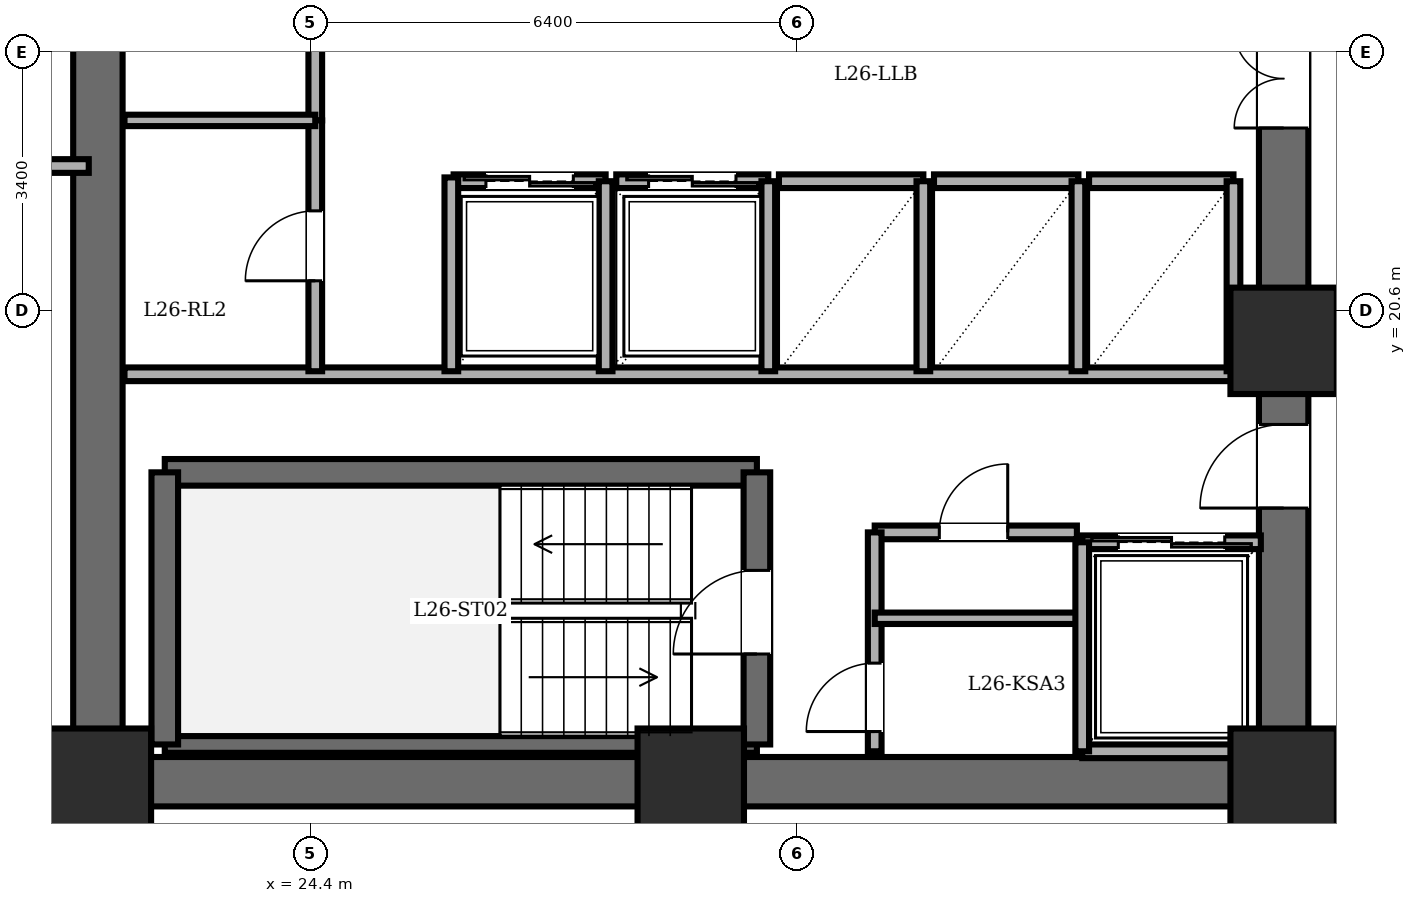
"""IFC4 building model, lengths in metres.
Left out: names, types, materials, properties, quantities, classifications, styles, units other than length and angle.
Written with IfcOpenShell. Run it as: python <this file> out.ifc"""

import sys

from ifc_helpers import new_model, si_unit, direction, frame, frame_2d, origin, origin_2d, place, context, subcontext, project, spatial, rectangle, extrude, element, fill, save


model = new_model("IFC4")
c1 = context("Model", 3, precision=1e-05, world=origin(), true_north=direction((0.0, 1.0)))
c2 = subcontext(c1, "Body", "Model", "MODEL_VIEW")
j1 = project(units=[si_unit("LENGTHUNIT", "METRE"), si_unit("PLANEANGLEUNIT", "RADIAN")], contexts=[c1])
p1 = place(None, origin())
s1 = spatial("IfcSite", under=j1, at=p1, CompositionType="ELEMENT")
p2 = place(p1, origin())
s2 = spatial("IfcBuilding", under=s1, at=p2, CompositionType="ELEMENT")
p3 = place(p2, frame((0.0, 0.0, 100.7)))
s3 = spatial("IfcBuildingStorey", under=s2, at=p3, CompositionType="ELEMENT", Elevation=100.7)
for number, where, z_axis, x_axis in (
    (1, (21.6, 14.4, 0.0), (0.0, 0.0, 1.0), (1.0, 0.0, 0.0)),
    (2, (29.4, 14.4, 0.0), (0.0, 0.0, 1.0), (1.0, 0.0, 0.0)),
    (3, (37.2, 14.4, 0.0), (0.0, 0.0, 1.0), (1.0, 0.0, 0.0)),
    (4, (37.2, 20.2, 0.0), (0.0, 0.0, 1.0), (1.0, 0.0, 0.0)),
):
    element("IfcColumn", number, at=place(p3, frame(where, z_axis=z_axis, x_axis=x_axis)), inside=s3, PredefinedType="COLUMN", context=c2, shape_type="SweptSolid", body=[
        extrude(rectangle(XDim=1.4, YDim=1.4, at=origin_2d()), origin(), (0.0, 0.0, 1.0), 3.6),
    ])
p4 = place(p3, frame((21.6, 14.4, 0.0), z_axis=(0.0, 0.0, 1.0), x_axis=(0.0, 1.0, 0.0)))
e5 = element("IfcWall", 5, at=p4, inside=s3, PredefinedType="SHEAR", context=c2, shape_type="SweptSolid", body=[
    extrude(rectangle(XDim=19.2, YDim=0.65, at=frame_2d((9.6, 0.0))), origin(), (0.0, 0.0, 1.0), 3.4),
])
p5 = place(p3, frame((37.2, 14.4, 0.0), z_axis=(0.0, 0.0, 1.0), x_axis=(-1.0, 0.0, 0.0)))
e6 = element("IfcWall", 6, at=p5, inside=s3, PredefinedType="SHEAR", context=c2, shape_type="SweptSolid", body=[
    extrude(rectangle(XDim=15.6, YDim=0.65, at=frame_2d((7.8, 0.0))), origin(), (0.0, 0.0, 1.0), 3.4),
])
p6 = place(p3, frame((37.2, 14.4, 0.0), z_axis=(0.0, 0.0, 1.0), x_axis=(0.0, 1.0, 0.0)))
e7 = element("IfcWall", 7, at=p6, inside=s3, PredefinedType="SHEAR", context=c2, shape_type="SweptSolid", body=[
    extrude(rectangle(XDim=19.2, YDim=0.65, at=frame_2d((9.6, 0.0))), origin(), (0.0, 0.0, 1.0), 3.4),
])
p7 = place(p6, frame((15.8, 0.0, 0.0)))
e8 = element("IfcOpeningElement", 8, at=p7, cuts=e7, PredefinedType="OPENING", context=c2, shape_type="SweptSolid", body=[
    extrude(rectangle(XDim=1.15, YDim=2.15, at=frame_2d((0.575, 1.075))), frame((0.0, 0.335, 0.0), z_axis=(0.0, -1.0, 0.0), x_axis=(1.0, 0.0, 0.0)), (0.0, 0.0, 1.0), 0.67),
])
p8 = place(p6, frame((3.6, 0.0, 0.0)))
e9 = element("IfcOpeningElement", 9, at=p8, cuts=e7, PredefinedType="OPENING", context=c2, shape_type="SweptSolid", body=[
    extrude(rectangle(XDim=1.1, YDim=2.15, at=frame_2d((0.55, 1.075))), frame((0.0, 0.335, 0.0), z_axis=(0.0, -1.0, 0.0), x_axis=(1.0, 0.0, 0.0)), (0.0, 0.0, 1.0), 0.67),
])
p9 = place(p6, frame((8.6, 0.0, 0.0)))
e10 = element("IfcOpeningElement", 10, at=p9, cuts=e7, PredefinedType="OPENING", context=c2, shape_type="SweptSolid", body=[
    extrude(rectangle(XDim=1.3, YDim=2.2, at=frame_2d((0.65, 1.1))), frame((0.0, 0.335, 0.0), z_axis=(0.0, -1.0, 0.0), x_axis=(1.0, 0.0, 0.0)), (0.0, 0.0, 1.0), 0.67),
])
p10 = place(p3, frame((22.48, 18.47, 0.0), z_axis=(0.0, 0.0, 1.0), x_axis=(1.0, 0.0, 0.0)))
e11 = element("IfcWall", 11, at=p10, inside=s3, PredefinedType="SOLIDWALL", context=c2, shape_type="SweptSolid", body=[
    extrude(rectangle(XDim=7.79, YDim=0.35, at=frame_2d((3.895, 0.0))), origin(), (0.0, 0.0, 1.0), 3.4),
])
p11 = place(p3, frame((22.48, 14.89, 0.0), z_axis=(0.0, 0.0, 1.0), x_axis=(1.0, 0.0, 0.0)))
e12 = element("IfcWall", 12, at=p11, inside=s3, PredefinedType="PARTITIONING", context=c2, shape_type="SweptSolid", body=[
    extrude(rectangle(XDim=7.79, YDim=0.22, at=frame_2d((3.895, 0.0))), origin(), (0.0, 0.0, 1.0), 3.4),
])
p12 = place(p3, frame((22.48, 14.89, 0.0), z_axis=(0.0, 0.0, 1.0), x_axis=(0.0, 1.0, 0.0)))
e13 = element("IfcWall", 13, at=p12, inside=s3, PredefinedType="SOLIDWALL", context=c2, shape_type="SweptSolid", body=[
    extrude(rectangle(XDim=3.58, YDim=0.35, at=frame_2d((1.79, 0.0))), origin(), (0.0, 0.0, 1.0), 3.4),
])
p13 = place(p3, frame((30.27, 14.89, 0.0), z_axis=(0.0, 0.0, 1.0), x_axis=(0.0, 1.0, 0.0)))
e14 = element("IfcWall", 14, at=p13, inside=s3, PredefinedType="SOLIDWALL", context=c2, shape_type="SweptSolid", body=[
    extrude(rectangle(XDim=3.58, YDim=0.35, at=frame_2d((1.79, 0.0))), origin(), (0.0, 0.0, 1.0), 3.4),
])
p14 = place(p13, frame((1.19, 0.0, 0.0)))
e15 = element("IfcOpeningElement", 15, at=p14, cuts=e14, PredefinedType="OPENING", context=c2, shape_type="SweptSolid", body=[
    extrude(rectangle(XDim=1.1, YDim=2.15, at=frame_2d((0.55, 1.075))), frame((0.0, 0.185, 0.0), z_axis=(0.0, -1.0, 0.0), x_axis=(1.0, 0.0, 0.0)), (0.0, 0.0, 1.0), 0.37),
])
p15 = place(p3, frame((21.95, 19.76, 0.0), z_axis=(0.0, 0.0, 1.0), x_axis=(1.0, 0.0, 0.0)))
e16 = element("IfcWall", 16, at=p15, inside=s3, PredefinedType="PARTITIONING", context=c2, shape_type="SweptSolid", body=[
    extrude(rectangle(XDim=14.87, YDim=0.18, at=frame_2d((7.435, 0.0))), origin(), (0.0, 0.0, 1.0), 3.4),
])
p16 = place(p3, frame((31.82, 17.68, 0.0), z_axis=(0.0, 0.0, 1.0), x_axis=(1.0, 0.0, 0.0)))
e17 = element("IfcWall", 17, at=p16, inside=s3, PredefinedType="PARTITIONING", context=c2, shape_type="SweptSolid", body=[
    extrude(rectangle(XDim=2.66, YDim=0.18, at=frame_2d((1.33, 0.0))), origin(), (0.0, 0.0, 1.0), 3.4),
])
p17 = place(p16, frame((0.85, 0.0, 0.0)))
e18 = element("IfcOpeningElement", 18, at=p17, cuts=e17, PredefinedType="OPENING", context=c2, shape_type="SweptSolid", body=[
    extrude(rectangle(XDim=0.9, YDim=2.05, at=frame_2d((0.45, 1.025))), frame((0.0, 0.1, 0.0), z_axis=(0.0, -1.0, 0.0), x_axis=(1.0, 0.0, 0.0)), (0.0, 0.0, 1.0), 0.2),
])
p18 = place(p3, frame((31.82, 14.8, 0.0), z_axis=(0.0, 0.0, 1.0), x_axis=(0.0, 1.0, 0.0)))
e19 = element("IfcWall", 19, at=p18, inside=s3, PredefinedType="PARTITIONING", context=c2, shape_type="SweptSolid", body=[
    extrude(rectangle(XDim=2.88, YDim=0.18, at=frame_2d((1.44, 0.0))), origin(), (0.0, 0.0, 1.0), 3.4),
])
p19 = place(p18, frame((0.26, 0.0, 0.0)))
e20 = element("IfcOpeningElement", 20, at=p19, cuts=e19, PredefinedType="OPENING", context=c2, shape_type="SweptSolid", body=[
    extrude(rectangle(XDim=0.9, YDim=2.05, at=frame_2d((0.45, 1.025))), frame((0.0, 0.1, 0.0), z_axis=(0.0, -1.0, 0.0), x_axis=(1.0, 0.0, 0.0)), (0.0, 0.0, 1.0), 0.2),
])
p20 = place(p3, frame((31.82, 16.55, 0.0), z_axis=(0.0, 0.0, 1.0), x_axis=(1.0, 0.0, 0.0)))
e21 = element("IfcWall", 21, at=p20, inside=s3, PredefinedType="PARTITIONING", context=c2, shape_type="SweptSolid", body=[
    extrude(rectangle(XDim=2.66, YDim=0.15, at=frame_2d((1.33, 0.0))), origin(), (0.0, 0.0, 1.0), 3.4),
])
p21 = place(p3, frame((34.55, 17.55, 0.0), z_axis=(0.0, 0.0, 1.0), x_axis=(1.0, 0.0, 0.0)))
e22 = element("IfcWall", 22, at=p21, inside=s3, PredefinedType="PARTITIONING", context=c2, shape_type="SweptSolid", body=[
    extrude(rectangle(XDim=2.35, YDim=0.18, at=frame_2d((1.175, 0.0))), origin(), (0.0, 0.0, 1.0), 3.4),
])
p22 = place(p21, frame((0.475, 0.0, 0.0)))
e23 = element("IfcOpeningElement", 23, at=p22, cuts=e22, PredefinedType="OPENING", context=c2, shape_type="SweptSolid", body=[
    extrude(rectangle(XDim=1.4, YDim=2.3, at=frame_2d((0.7, 1.15))), frame((0.0, 0.1, 0.0), z_axis=(0.0, -1.0, 0.0), x_axis=(1.0, 0.0, 0.0)), (0.0, 0.0, 1.0), 0.2),
])
p23 = place(p3, frame((36.9, 14.8, 0.0), z_axis=(0.0, 0.0, 1.0), x_axis=(-1.0, 0.0, 0.0)))
e24 = element("IfcWall", 24, at=p23, inside=s3, PredefinedType="PARTITIONING", context=c2, shape_type="SweptSolid", body=[
    extrude(rectangle(XDim=2.35, YDim=0.18, at=frame_2d((1.175, 0.0))), origin(), (0.0, 0.0, 1.0), 3.4),
])
p24 = place(p3, frame((34.55, 17.55, 0.0), z_axis=(0.0, 0.0, 1.0), x_axis=(0.0, -1.0, 0.0)))
e25 = element("IfcWall", 25, at=p24, inside=s3, PredefinedType="PARTITIONING", context=c2, shape_type="SweptSolid", body=[
    extrude(rectangle(XDim=2.75, YDim=0.18, at=frame_2d((1.375, 0.0))), origin(), (0.0, 0.0, 1.0), 3.4),
])
p25 = place(p3, frame((26.28, 22.3, 0.0), z_axis=(0.0, 0.0, 1.0), x_axis=(1.0, 0.0, 0.0)))
e26 = element("IfcWall", 26, at=p25, inside=s3, PredefinedType="PARTITIONING", context=c2, shape_type="SweptSolid", body=[
    extrude(rectangle(XDim=2.0, YDim=0.18, at=frame_2d((1.0, 0.0))), origin(), (0.0, 0.0, 1.0), 3.4),
])
p26 = place(p25, frame((0.425, 0.0, 0.0)))
e27 = element("IfcOpeningElement", 27, at=p26, cuts=e26, PredefinedType="OPENING", context=c2, shape_type="SweptSolid", body=[
    extrude(rectangle(XDim=1.15, YDim=2.2, at=frame_2d((0.575, 1.1))), frame((0.0, 0.1, 0.0), z_axis=(0.0, -1.0, 0.0), x_axis=(1.0, 0.0, 0.0)), (0.0, 0.0, 1.0), 0.2),
])
p27 = place(p3, frame((28.28, 19.8, 0.0), z_axis=(0.0, 0.0, 1.0), x_axis=(0.0, 1.0, 0.0)))
e28 = element("IfcWall", 28, at=p27, inside=s3, PredefinedType="PARTITIONING", context=c2, shape_type="SweptSolid", body=[
    extrude(rectangle(XDim=2.5, YDim=0.18, at=frame_2d((1.25, 0.0))), origin(), (0.0, 0.0, 1.0), 3.4),
])
p28 = place(p3, frame((28.42, 22.3, 0.0), z_axis=(0.0, 0.0, 1.0), x_axis=(1.0, 0.0, 0.0)))
e29 = element("IfcWall", 29, at=p28, inside=s3, PredefinedType="PARTITIONING", context=c2, shape_type="SweptSolid", body=[
    extrude(rectangle(XDim=2.0, YDim=0.18, at=frame_2d((1.0, 0.0))), origin(), (0.0, 0.0, 1.0), 3.4),
])
p29 = place(p28, frame((0.425, 0.0, 0.0)))
e30 = element("IfcOpeningElement", 30, at=p29, cuts=e29, PredefinedType="OPENING", context=c2, shape_type="SweptSolid", body=[
    extrude(rectangle(XDim=1.15, YDim=2.2, at=frame_2d((0.575, 1.1))), frame((0.0, 0.1, 0.0), z_axis=(0.0, -1.0, 0.0), x_axis=(1.0, 0.0, 0.0)), (0.0, 0.0, 1.0), 0.2),
])
p30 = place(p3, frame((30.42, 19.8, 0.0), z_axis=(0.0, 0.0, 1.0), x_axis=(0.0, 1.0, 0.0)))
e31 = element("IfcWall", 31, at=p30, inside=s3, PredefinedType="PARTITIONING", context=c2, shape_type="SweptSolid", body=[
    extrude(rectangle(XDim=2.5, YDim=0.18, at=frame_2d((1.25, 0.0))), origin(), (0.0, 0.0, 1.0), 3.4),
])
p31 = place(p3, frame((30.56, 22.3, 0.0), z_axis=(0.0, 0.0, 1.0), x_axis=(1.0, 0.0, 0.0)))
e32 = element("IfcWall", 32, at=p31, inside=s3, PredefinedType="PARTITIONING", context=c2, shape_type="SweptSolid", body=[
    extrude(rectangle(XDim=1.9, YDim=0.18, at=frame_2d((0.95, 0.0))), origin(), (0.0, 0.0, 1.0), 3.4),
])
p32 = place(p3, frame((32.46, 19.8, 0.0), z_axis=(0.0, 0.0, 1.0), x_axis=(0.0, 1.0, 0.0)))
e33 = element("IfcWall", 33, at=p32, inside=s3, PredefinedType="PARTITIONING", context=c2, shape_type="SweptSolid", body=[
    extrude(rectangle(XDim=2.5, YDim=0.18, at=frame_2d((1.25, 0.0))), origin(), (0.0, 0.0, 1.0), 3.4),
])
p33 = place(p3, frame((32.6, 22.3, 0.0), z_axis=(0.0, 0.0, 1.0), x_axis=(1.0, 0.0, 0.0)))
e34 = element("IfcWall", 34, at=p33, inside=s3, PredefinedType="PARTITIONING", context=c2, shape_type="SweptSolid", body=[
    extrude(rectangle(XDim=1.9, YDim=0.18, at=frame_2d((0.95, 0.0))), origin(), (0.0, 0.0, 1.0), 3.4),
])
p34 = place(p3, frame((34.5, 19.8, 0.0), z_axis=(0.0, 0.0, 1.0), x_axis=(0.0, 1.0, 0.0)))
e35 = element("IfcWall", 35, at=p34, inside=s3, PredefinedType="PARTITIONING", context=c2, shape_type="SweptSolid", body=[
    extrude(rectangle(XDim=2.5, YDim=0.18, at=frame_2d((1.25, 0.0))), origin(), (0.0, 0.0, 1.0), 3.4),
])
p35 = place(p3, frame((34.64, 22.3, 0.0), z_axis=(0.0, 0.0, 1.0), x_axis=(1.0, 0.0, 0.0)))
e36 = element("IfcWall", 36, at=p35, inside=s3, PredefinedType="PARTITIONING", context=c2, shape_type="SweptSolid", body=[
    extrude(rectangle(XDim=1.9, YDim=0.18, at=frame_2d((0.95, 0.0))), origin(), (0.0, 0.0, 1.0), 3.4),
])
p36 = place(p3, frame((36.54, 19.8, 0.0), z_axis=(0.0, 0.0, 1.0), x_axis=(0.0, 1.0, 0.0)))
e37 = element("IfcWall", 37, at=p36, inside=s3, PredefinedType="PARTITIONING", context=c2, shape_type="SweptSolid", body=[
    extrude(rectangle(XDim=2.5, YDim=0.18, at=frame_2d((1.25, 0.0))), origin(), (0.0, 0.0, 1.0), 3.4),
])
p37 = place(p3, frame((24.46, 23.1, 0.0), z_axis=(0.0, 0.0, 1.0), x_axis=(0.0, 1.0, 0.0)))
e38 = element("IfcWall", 38, at=p37, inside=s3, PredefinedType="PARTITIONING", context=c2, shape_type="SweptSolid", body=[
    extrude(rectangle(XDim=4.4, YDim=0.18, at=frame_2d((2.2, 0.0))), origin(), (0.0, 0.0, 1.0), 3.4),
])
p38 = place(p37, frame((1.74, 0.0, 0.0)))
e39 = element("IfcOpeningElement", 39, at=p38, cuts=e38, PredefinedType="OPENING", context=c2, shape_type="SweptSolid", body=[
    extrude(rectangle(XDim=0.92, YDim=2.1, at=frame_2d((0.46, 1.05))), frame((0.0, 0.1, 0.0), z_axis=(0.0, -1.0, 0.0), x_axis=(1.0, 0.0, 0.0)), (0.0, 0.0, 1.0), 0.2),
])
p39 = place(p3, frame((24.46, 19.8, 0.0), z_axis=(0.0, 0.0, 1.0), x_axis=(0.0, 1.0, 0.0)))
e40 = element("IfcWall", 40, at=p39, inside=s3, PredefinedType="PARTITIONING", context=c2, shape_type="SweptSolid", body=[
    extrude(rectangle(XDim=3.3, YDim=0.18, at=frame_2d((1.65, 0.0))), origin(), (0.0, 0.0, 1.0), 3.4),
])
p40 = place(p39, frame((1.19, 0.0, 0.0)))
e41 = element("IfcOpeningElement", 41, at=p40, cuts=e40, PredefinedType="OPENING", context=c2, shape_type="SweptSolid", body=[
    extrude(rectangle(XDim=0.92, YDim=2.1, at=frame_2d((0.46, 1.05))), frame((0.0, 0.1, 0.0), z_axis=(0.0, -1.0, 0.0), x_axis=(1.0, 0.0, 0.0)), (0.0, 0.0, 1.0), 0.2),
])
p41 = place(p3, frame((21.95, 23.1, 0.0), z_axis=(0.0, 0.0, 1.0), x_axis=(1.0, 0.0, 0.0)))
e42 = element("IfcWall", 42, at=p41, inside=s3, PredefinedType="PARTITIONING", context=c2, shape_type="SweptSolid", body=[
    extrude(rectangle(XDim=2.51, YDim=0.15, at=frame_2d((1.255, 0.0))), origin(), (0.0, 0.0, 1.0), 3.4),
])
p42 = place(p3, frame((26.25, 19.8, 0.0), z_axis=(0.0, 0.0, 1.0), x_axis=(0.0, 1.0, 0.0)))
e43 = element("IfcWall", 43, at=p42, inside=s3, PredefinedType="PARTITIONING", context=c2, shape_type="SweptSolid", body=[
    extrude(rectangle(XDim=2.55, YDim=0.18, at=frame_2d((1.275, 0.0))), origin(), (0.0, 0.0, 1.0), 3.4),
])
p43 = place(p3, frame((8.8, 14.18, 0.0), z_axis=(0.0, 0.0, 1.0), x_axis=(1.0, 0.0, 0.0)))
e44 = element("IfcWall", 44, at=p43, inside=s3, PredefinedType="PARTITIONING", context=c2, shape_type="SweptSolid", body=[
    extrude(rectangle(XDim=12.68, YDim=0.18, at=frame_2d((6.34, 0.0))), origin(), (0.0, 0.0, 1.0), 3.4),
])
p44 = place(p43, frame((6.18, 0.0, 0.0)))
e45 = element("IfcOpeningElement", 45, at=p44, cuts=e44, PredefinedType="OPENING", context=c2, shape_type="SweptSolid", body=[
    extrude(rectangle(XDim=1.0, YDim=2.15, at=frame_2d((0.5, 1.075))), frame((0.0, 0.1, 0.0), z_axis=(0.0, -1.0, 0.0), x_axis=(1.0, 0.0, 0.0)), (0.0, 0.0, 1.0), 0.2),
])
p45 = place(p3, frame((8.8, 22.5, 0.0), z_axis=(0.0, 0.0, 1.0), x_axis=(1.0, 0.0, 0.0)))
e46 = element("IfcWall", 46, at=p45, inside=s3, PredefinedType="PARTITIONING", context=c2, shape_type="SweptSolid", body=[
    extrude(rectangle(XDim=12.68, YDim=0.18, at=frame_2d((6.34, 0.0))), origin(), (0.0, 0.0, 1.0), 3.4),
])
p46 = place(p14, origin())
e47 = element("IfcDoor", 47, at=p46, inside=s3, OperationType="SINGLE_SWING_LEFT", PredefinedType="DOOR", context=c2, shape_type="SweptSolid", body=[
    extrude(rectangle(XDim=1.1, YDim=2.15, at=frame_2d((0.55, 1.075))), frame((0.0, 0.025, 0.0), z_axis=(0.0, -1.0, 0.0), x_axis=(1.0, 0.0, 0.0)), (0.0, 0.0, 1.0), 0.05),
])
fill(e15, e47)
p47 = place(p8, origin())
e48 = element("IfcDoor", 48, at=p47, inside=s3, OperationType="SINGLE_SWING_LEFT", PredefinedType="DOOR", context=c2, shape_type="SweptSolid", body=[
    extrude(rectangle(XDim=1.1, YDim=2.15, at=frame_2d((0.55, 1.075))), frame((0.0, 0.025, 0.0), z_axis=(0.0, -1.0, 0.0), x_axis=(1.0, 0.0, 0.0)), (0.0, 0.0, 1.0), 0.05),
])
fill(e9, e48)
p48 = place(p17, origin())
e49 = element("IfcDoor", 49, at=p48, inside=s3, OperationType="SINGLE_SWING_RIGHT", PredefinedType="DOOR", context=c2, shape_type="SweptSolid", body=[
    extrude(rectangle(XDim=0.9, YDim=2.05, at=frame_2d((0.45, 1.025))), frame((0.0, 0.025, 0.0), z_axis=(0.0, -1.0, 0.0), x_axis=(1.0, 0.0, 0.0)), (0.0, 0.0, 1.0), 0.05),
])
fill(e18, e49)
p49 = place(p19, origin())
e50 = element("IfcDoor", 50, at=p49, inside=s3, OperationType="SINGLE_SWING_LEFT", PredefinedType="DOOR", context=c2, shape_type="SweptSolid", body=[
    extrude(rectangle(XDim=0.9, YDim=2.05, at=frame_2d((0.45, 1.025))), frame((0.0, 0.025, 0.0), z_axis=(0.0, -1.0, 0.0), x_axis=(1.0, 0.0, 0.0)), (0.0, 0.0, 1.0), 0.05),
])
fill(e20, e50)
p50 = place(p22, origin())
e51 = element("IfcDoor", 51, at=p50, inside=s3, OperationType="DOUBLE_DOOR_SLIDING", PredefinedType="DOOR", context=c2, shape_type="SweptSolid", body=[
    extrude(rectangle(XDim=1.4, YDim=2.3, at=frame_2d((0.7, 1.15))), frame((0.0, 0.025, 0.0), z_axis=(0.0, -1.0, 0.0), x_axis=(1.0, 0.0, 0.0)), (0.0, 0.0, 1.0), 0.05),
])
fill(e23, e51)
p51 = place(p26, origin())
e52 = element("IfcDoor", 52, at=p51, inside=s3, OperationType="DOUBLE_DOOR_SLIDING", PredefinedType="DOOR", context=c2, shape_type="SweptSolid", body=[
    extrude(rectangle(XDim=1.15, YDim=2.2, at=frame_2d((0.575, 1.1))), frame((0.0, 0.025, 0.0), z_axis=(0.0, -1.0, 0.0), x_axis=(1.0, 0.0, 0.0)), (0.0, 0.0, 1.0), 0.05),
])
fill(e27, e52)
p52 = place(p29, origin())
e53 = element("IfcDoor", 53, at=p52, inside=s3, OperationType="DOUBLE_DOOR_SLIDING", PredefinedType="DOOR", context=c2, shape_type="SweptSolid", body=[
    extrude(rectangle(XDim=1.15, YDim=2.2, at=frame_2d((0.575, 1.1))), frame((0.0, 0.025, 0.0), z_axis=(0.0, -1.0, 0.0), x_axis=(1.0, 0.0, 0.0)), (0.0, 0.0, 1.0), 0.05),
])
fill(e30, e53)
p53 = place(p40, origin())
e54 = element("IfcDoor", 54, at=p53, inside=s3, OperationType="SINGLE_SWING_LEFT", PredefinedType="DOOR", context=c2, shape_type="SweptSolid", body=[
    extrude(rectangle(XDim=0.92, YDim=2.1, at=frame_2d((0.46, 1.05))), frame((0.0, 0.025, 0.0), z_axis=(0.0, -1.0, 0.0), x_axis=(1.0, 0.0, 0.0)), (0.0, 0.0, 1.0), 0.05),
])
fill(e41, e54)
p54 = place(p9, origin())
e55 = element("IfcDoor", 55, at=p54, inside=s3, OperationType="DOUBLE_DOOR_SINGLE_SWING", PredefinedType="DOOR", context=c2, shape_type="SweptSolid", body=[
    extrude(rectangle(XDim=1.3, YDim=2.2, at=frame_2d((0.65, 1.1))), frame((0.0, 0.025, 0.0), z_axis=(0.0, -1.0, 0.0), x_axis=(1.0, 0.0, 0.0)), (0.0, 0.0, 1.0), 0.05),
])
fill(e10, e55)
save(model, sys.argv[1])
